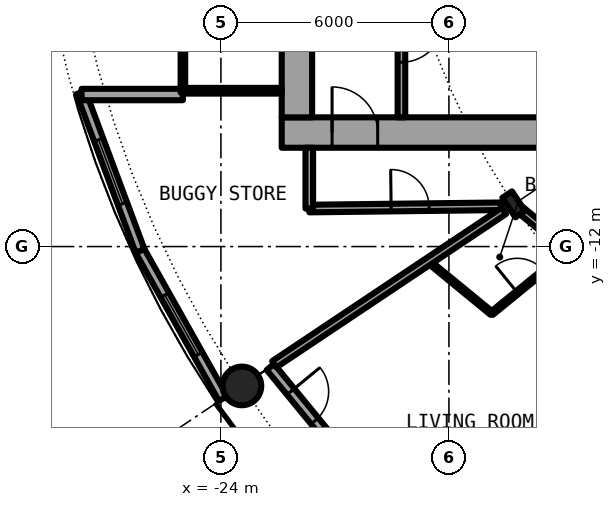
"""IFC4 building model, lengths in metres.
Left out: names, types, materials, properties, quantities, classifications, styles, units other than length and angle.
Written with IfcOpenShell. Run it as: python <this file> out.ifc"""

import sys

from ifc_helpers import new_model, si_unit, direction, frame, frame_2d, origin, origin_2d, place, context, subcontext, project, spatial, rectangle, hollow_circle, i_section, extrude, element, fill, save


model = new_model("IFC4")
c1 = context("Model", 3, precision=1e-05, world=origin(), true_north=direction((0.0, 1.0)))
c2 = subcontext(c1, "Body", "Model", "MODEL_VIEW")
j1 = project(units=[si_unit("LENGTHUNIT", "METRE"), si_unit("PLANEANGLEUNIT", "RADIAN")], contexts=[c1])
p1 = place(None, origin())
s1 = spatial("IfcSite", under=j1, at=p1, CompositionType="ELEMENT")
p2 = place(p1, origin())
s2 = spatial("IfcBuilding", under=s1, at=p2, CompositionType="ELEMENT")
p3 = place(p2, frame((0.0, 0.0, 35.0)))
s3 = spatial("IfcBuildingStorey", under=s2, at=p3, CompositionType="ELEMENT", Elevation=35.0)
p4 = place(p3, frame((-23.448, -15.667, 0.0), z_axis=(0.0, 0.0, 1.0), x_axis=(1.0, 0.0, 0.0)))
e1 = element("IfcColumn", 1, at=p4, inside=s3, PredefinedType="COLUMN", context=c2, shape_type="SweptSolid", body=[
    extrude(hollow_circle(Radius=0.508, WallThickness=0.05, at=origin_2d()), origin(), (0.0, 0.0, 1.0), 3.05),
])
p5 = place(p3, frame((-16.297, -10.889, 0.0), z_axis=(0.0, 0.0, 1.0), x_axis=(-0.831469612303, -0.55557023302, 0.0)))
e2 = element("IfcColumn", 2, at=p5, inside=s3, PredefinedType="COLUMN", context=c2, shape_type="SweptSolid", body=[
    extrude(i_section(OverallWidth=0.305, OverallDepth=0.62, WebThickness=0.021, FlangeThickness=0.04, FilletRadius=0.027, at=origin_2d()), origin(), (0.0, 0.0, 1.0), 3.05),
])
p6 = place(p3, frame((-22.699, -15.167, 0.0), z_axis=(0.0, 0.0, 1.0), x_axis=(0.634382322723, -0.773019449054, 0.0)))
e3 = element("IfcWall", 3, at=p6, inside=s3, PredefinedType="SOLIDWALL", context=c2, shape_type="SweptSolid", body=[
    extrude(rectangle(XDim=5.352, YDim=0.25, at=frame_2d((2.676, 0.0))), origin(), (0.0, 0.0, 1.0), 2.7),
])
p7 = place(p6, frame((0.841, 0.0, 0.0)))
e4 = element("IfcOpeningElement", 4, at=p7, cuts=e3, PredefinedType="OPENING", context=c2, shape_type="SweptSolid", body=[
    extrude(rectangle(XDim=1.0, YDim=2.2, at=frame_2d((0.5, 1.1))), frame((0.0, 0.135, 0.0), z_axis=(0.0, -1.0, 0.0), x_axis=(1.0, 0.0, 0.0)), (0.0, 0.0, 1.0), 0.27),
])
p8 = place(p6, frame((3.111, 0.0, 0.3)))
e5 = element("IfcOpeningElement", 5, at=p8, cuts=e3, PredefinedType="OPENING", context=c2, shape_type="SweptSolid", body=[
    extrude(rectangle(XDim=1.8, YDim=2.1, at=frame_2d((0.9, 1.05))), frame((0.0, 0.135, 0.0), z_axis=(0.0, -1.0, 0.0), x_axis=(1.0, 0.0, 0.0)), (0.0, 0.0, 1.0), 0.27),
])
p9 = place(p3, frame((-27.682, -7.945, 0.0), z_axis=(0.0, 0.0, 1.0), x_axis=(0.349247811493, -0.937030397675, 0.0)))
e6 = element("IfcWall", 6, at=p9, inside=s3, PredefinedType="SOLIDWALL", context=c2, shape_type="SweptSolid", body=[
    extrude(rectangle(XDim=4.452, YDim=0.25, at=frame_2d((2.226, 0.0))), origin(), (0.0, 0.0, 1.0), 2.7),
])
p10 = place(p9, frame((1.327, 0.0, 0.3)))
e7 = element("IfcOpeningElement", 7, at=p10, cuts=e6, PredefinedType="OPENING", context=c2, shape_type="SweptSolid", body=[
    extrude(rectangle(XDim=1.8, YDim=2.1, at=frame_2d((0.9, 1.05))), frame((0.0, 0.135, 0.0), z_axis=(0.0, -1.0, 0.0), x_axis=(1.0, 0.0, 0.0)), (0.0, 0.0, 1.0), 0.27),
])
p11 = place(p3, frame((-26.127, -12.117, 0.0), z_axis=(0.0, 0.0, 1.0), x_axis=(0.489696356642, -0.871893042919, 0.0)))
e8 = element("IfcWall", 8, at=p11, inside=s3, PredefinedType="SOLIDWALL", context=c2, shape_type="SweptSolid", body=[
    extrude(rectangle(XDim=4.454, YDim=0.25, at=frame_2d((2.227, 0.0))), origin(), (0.0, 0.0, 1.0), 2.7),
])
p12 = place(p11, frame((1.327, 0.0, 0.3)))
e9 = element("IfcOpeningElement", 9, at=p12, cuts=e8, PredefinedType="OPENING", context=c2, shape_type="SweptSolid", body=[
    extrude(rectangle(XDim=1.8, YDim=2.1, at=frame_2d((0.9, 1.05))), frame((0.0, 0.135, 0.0), z_axis=(0.0, -1.0, 0.0), x_axis=(1.0, 0.0, 0.0)), (0.0, 0.0, 1.0), 0.27),
])
p13 = place(p3, frame((-25.0, -8.0, 0.0), z_axis=(0.0, 0.0, 1.0), x_axis=(-1.0, 0.0, 0.0)))
e10 = element("IfcWall", 10, at=p13, inside=s3, PredefinedType="SOLIDWALL", context=c2, shape_type="SweptSolid", body=[
    extrude(rectangle(XDim=2.667, YDim=0.3, at=frame_2d((1.333, 0.0))), origin(), (0.0, 0.0, 1.0), 2.7),
])
p14 = place(p3, frame((-22.4, -9.0, 0.0), z_axis=(0.0, 0.0, 1.0), x_axis=(1.0, 0.0, 0.0)))
e11 = element("IfcWall", 11, at=p14, inside=s3, PredefinedType="SHEAR", context=c2, shape_type="SweptSolid", body=[
    extrude(rectangle(XDim=14.2, YDim=0.8, at=frame_2d((7.1, 0.0))), origin(), (0.0, 0.0, 1.0), 3.05),
])
p15 = place(p14, frame((1.325, 0.0, 0.0)))
e12 = element("IfcOpeningElement", 12, at=p15, cuts=e11, PredefinedType="OPENING", context=c2, shape_type="SweptSolid", body=[
    extrude(rectangle(XDim=1.2, YDim=2.3, at=frame_2d((0.6, 1.15))), frame((0.0, 0.41, 0.0), z_axis=(0.0, -1.0, 0.0), x_axis=(1.0, 0.0, 0.0)), (0.0, 0.0, 1.0), 0.82),
])
p16 = place(p3, frame((-22.0, -8.6, 0.0), z_axis=(0.0, 0.0, 1.0), x_axis=(0.0, 1.0, 0.0)))
e13 = element("IfcWall", 13, at=p16, inside=s3, PredefinedType="SHEAR", context=c2, shape_type="SweptSolid", body=[
    extrude(rectangle(XDim=17.2, YDim=0.8, at=frame_2d((8.6, 0.0))), origin(), (0.0, 0.0, 1.0), 3.05),
])
p17 = place(p16, frame((7.7, 0.0, 0.0)))
e14 = element("IfcOpeningElement", 14, at=p17, cuts=e13, PredefinedType="OPENING", context=c2, shape_type="SweptSolid", body=[
    extrude(rectangle(XDim=1.8, YDim=2.3, at=frame_2d((0.9, 1.15))), frame((0.0, 0.41, 0.0), z_axis=(0.0, -1.0, 0.0), x_axis=(1.0, 0.0, 0.0)), (0.0, 0.0, 1.0), 0.82),
])
p18 = place(p3, frame((-19.25, -1.575, 0.0), z_axis=(0.0, 0.0, 1.0), x_axis=(0.0, -1.0, 0.0)))
e15 = element("IfcWall", 15, at=p18, inside=s3, PredefinedType="SOLIDWALL", context=c2, shape_type="SweptSolid", body=[
    extrude(rectangle(XDim=7.025, YDim=0.2, at=frame_2d((3.513, 0.0))), origin(), (0.0, 0.0, 1.0), 2.7),
])
p19 = place(p18, frame((4.475, 0.0, 0.0)))
e16 = element("IfcOpeningElement", 16, at=p19, cuts=e15, PredefinedType="OPENING", context=c2, shape_type="SweptSolid", body=[
    extrude(rectangle(XDim=1.1, YDim=2.3, at=frame_2d((0.55, 1.15))), frame((0.0, 0.11, 0.0), z_axis=(0.0, -1.0, 0.0), x_axis=(1.0, 0.0, 0.0)), (0.0, 0.0, 1.0), 0.22),
])
p20 = place(p3, frame((-22.4, -7.9, 0.0), z_axis=(0.0, 0.0, 1.0), x_axis=(-1.0, 0.0, 0.0)))
e17 = element("IfcWall", 17, at=p20, inside=s3, PredefinedType="PARTITIONING", context=c2, shape_type="SweptSolid", body=[
    extrude(rectangle(XDim=2.54, YDim=0.15, at=frame_2d((1.27, 0.0))), origin(), (0.0, 0.0, 1.0), 2.7),
])
p21 = place(p3, frame((-25.0, 7.95, 0.0), z_axis=(0.0, 0.0, 1.0), x_axis=(0.0, -1.0, 0.0)))
e18 = element("IfcWall", 18, at=p21, inside=s3, PredefinedType="PARTITIONING", context=c2, shape_type="SweptSolid", body=[
    extrude(rectangle(XDim=15.9, YDim=0.12, at=frame_2d((7.95, 0.0))), origin(), (0.0, 0.0, 1.0), 2.7),
])
p22 = place(p21, frame((0.95, 0.0, 0.1)))
e19 = element("IfcOpeningElement", 19, at=p22, cuts=e18, PredefinedType="OPENING", context=c2, shape_type="SweptSolid", body=[
    extrude(rectangle(XDim=14.0, YDim=2.35, at=frame_2d((7.0, 1.175))), frame((0.0, 0.07, 0.0), z_axis=(0.0, -1.0, 0.0), x_axis=(1.0, 0.0, 0.0)), (0.0, 0.0, 1.0), 0.14),
])
p23 = place(p3, frame((-18.542, -12.389, 0.0), z_axis=(0.0, 0.0, 1.0), x_axis=(0.772948171844, -0.634469166818, 0.0)))
e20 = element("IfcWall", 20, at=p23, inside=s3, PredefinedType="PARTITIONING", context=c2, shape_type="SweptSolid", body=[
    extrude(rectangle(XDim=2.158, YDim=0.1, at=frame_2d((1.079, 0.0))), origin(), (0.0, 0.0, 1.0), 2.7),
])
p24 = place(p3, frame((-16.173, -10.99, 0.0), z_axis=(0.0, 0.0, 1.0), x_axis=(0.772704887747, -0.634765434198, 0.0)))
e21 = element("IfcWall", 21, at=p24, inside=s3, PredefinedType="PARTITIONING", context=c2, shape_type="SweptSolid", body=[
    extrude(rectangle(XDim=11.209, YDim=0.2, at=frame_2d((5.604, 0.0))), origin(), (0.0, 0.0, 1.0), 2.38),
])
p25 = place(p24, frame((3.137, 0.0, 0.0)))
e22 = element("IfcOpeningElement", 22, at=p25, cuts=e21, PredefinedType="OPENING", context=c2, shape_type="SweptSolid", body=[
    extrude(rectangle(XDim=1.0, YDim=2.3, at=frame_2d((0.5, 1.15))), frame((0.0, 0.11, 0.0), z_axis=(0.0, -1.0, 0.0), x_axis=(1.0, 0.0, 0.0)), (0.0, 0.0, 1.0), 0.22),
])
p26 = place(p3, frame((-21.675, -11.0, 0.0), z_axis=(0.0, 0.0, 1.0), x_axis=(0.999928980998, 0.011917758204, 0.0)))
e23 = element("IfcWall", 23, at=p26, inside=s3, PredefinedType="PARTITIONING", context=c2, shape_type="SweptSolid", body=[
    extrude(rectangle(XDim=5.039, YDim=0.2, at=frame_2d((2.52, 0.0))), origin(), (0.0, 0.0, 1.0), 2.7),
])
p27 = place(p26, frame((2.154, 0.0, 0.0)))
e24 = element("IfcOpeningElement", 24, at=p27, cuts=e23, PredefinedType="OPENING", context=c2, shape_type="SweptSolid", body=[
    extrude(rectangle(XDim=1.0, YDim=2.3, at=frame_2d((0.5, 1.15))), frame((0.0, 0.11, 0.0), z_axis=(0.0, -1.0, 0.0), x_axis=(1.0, 0.0, 0.0)), (0.0, 0.0, 1.0), 0.22),
])
p28 = place(p3, frame((-22.596, -15.097, 0.0), z_axis=(0.0, 0.0, 1.0), x_axis=(0.831610607528, 0.555359160765, 0.0)))
e25 = element("IfcWall", 25, at=p28, inside=s3, PredefinedType="PARTITIONING", context=c2, shape_type="SweptSolid", body=[
    extrude(rectangle(XDim=7.265, YDim=0.2, at=frame_2d((3.633, 0.0))), origin(), (0.0, 0.0, 1.0), 2.7),
])
p29 = place(p3, frame((-17.24, -21.007, 0.0), z_axis=(0.0, 0.0, 1.0), x_axis=(0.634396151441, 0.77300810024, 0.0)))
e26 = element("IfcWall", 26, at=p29, inside=s3, PredefinedType="PARTITIONING", context=c2, shape_type="SweptSolid", body=[
    extrude(rectangle(XDim=8.419, YDim=0.1, at=frame_2d((4.209, 0.0))), origin(), (0.0, 0.0, 1.0), 2.7),
])
p30 = place(p29, frame((6.679, 0.0, 0.0)))
e27 = element("IfcOpeningElement", 27, at=p30, cuts=e26, PredefinedType="OPENING", context=c2, shape_type="SweptSolid", body=[
    extrude(rectangle(XDim=0.9, YDim=2.3, at=frame_2d((0.45, 1.15))), frame((0.0, 0.06, 0.0), z_axis=(0.0, -1.0, 0.0), x_axis=(1.0, 0.0, 0.0)), (0.0, 0.0, 1.0), 0.12),
])
p31 = place(p29, frame((2.468, 0.0, 0.0)))
e28 = element("IfcOpeningElement", 28, at=p31, cuts=e26, PredefinedType="OPENING", context=c2, shape_type="SweptSolid", body=[
    extrude(rectangle(XDim=0.9, YDim=2.3, at=frame_2d((0.45, 1.15))), frame((0.0, 0.06, 0.0), z_axis=(0.0, -1.0, 0.0), x_axis=(1.0, 0.0, 0.0)), (0.0, 0.0, 1.0), 0.12),
])
p32 = place(p3, frame((-16.874, -13.758, 0.0), z_axis=(0.0, 0.0, 1.0), x_axis=(0.774979608522, 0.631986239072, 0.0)))
e29 = element("IfcWall", 29, at=p32, inside=s3, PredefinedType="PARTITIONING", context=c2, shape_type="SweptSolid", body=[
    extrude(rectangle(XDim=2.636, YDim=0.1, at=frame_2d((1.318, 0.0))), origin(), (0.0, 0.0, 1.0), 2.7),
])
p33 = place(p32, frame((0.868, 0.0, 0.0)))
e30 = element("IfcOpeningElement", 30, at=p33, cuts=e29, PredefinedType="OPENING", context=c2, shape_type="SweptSolid", body=[
    extrude(rectangle(XDim=0.9, YDim=2.3, at=frame_2d((0.45, 1.15))), frame((0.0, 0.06, 0.0), z_axis=(0.0, -1.0, 0.0), x_axis=(1.0, 0.0, 0.0)), (0.0, 0.0, 1.0), 0.12),
])
p34 = place(p3, frame((-21.675, -11.0, 0.0), z_axis=(0.0, 0.0, 1.0), x_axis=(0.0, 1.0, 0.0)))
e31 = element("IfcWall", 31, at=p34, inside=s3, PredefinedType="PARTITIONING", context=c2, shape_type="SweptSolid", body=[
    extrude(rectangle(XDim=1.6, YDim=0.2, at=frame_2d((0.8, 0.0))), origin(), (0.0, 0.0, 1.0), 2.7),
])
p35 = place(p7, origin())
e32 = element("IfcDoor", 32, at=p35, inside=s3, OperationType="SINGLE_SWING_LEFT", PredefinedType="DOOR", context=c2, shape_type="SweptSolid", body=[
    extrude(rectangle(XDim=1.0, YDim=2.2, at=frame_2d((0.5, 1.1))), frame((0.0, 0.025, 0.0), z_axis=(0.0, -1.0, 0.0), x_axis=(1.0, 0.0, 0.0)), (0.0, 0.0, 1.0), 0.05),
])
fill(e4, e32)
p36 = place(p10, origin())
e33 = element("IfcWindow", 33, at=p36, inside=s3, PartitioningType="SINGLE_PANEL", PredefinedType="WINDOW", context=c2, shape_type="SweptSolid", body=[
    extrude(rectangle(XDim=1.8, YDim=2.1, at=frame_2d((0.9, 1.05))), frame((0.0, 0.03, 0.0), z_axis=(0.0, -1.0, 0.0), x_axis=(1.0, 0.0, 0.0)), (0.0, 0.0, 1.0), 0.06),
])
fill(e7, e33)
p37 = place(p12, origin())
e34 = element("IfcWindow", 34, at=p37, inside=s3, PartitioningType="SINGLE_PANEL", PredefinedType="WINDOW", context=c2, shape_type="SweptSolid", body=[
    extrude(rectangle(XDim=1.8, YDim=2.1, at=frame_2d((0.9, 1.05))), frame((0.0, 0.03, 0.0), z_axis=(0.0, -1.0, 0.0), x_axis=(1.0, 0.0, 0.0)), (0.0, 0.0, 1.0), 0.06),
])
fill(e9, e34)
p38 = place(p19, origin())
e35 = element("IfcDoor", 35, at=p38, inside=s3, OperationType="SINGLE_SWING_LEFT", PredefinedType="DOOR", context=c2, shape_type="SweptSolid", body=[
    extrude(rectangle(XDim=1.1, YDim=2.3, at=frame_2d((0.55, 1.15))), frame((0.0, 0.025, 0.0), z_axis=(0.0, -1.0, 0.0), x_axis=(1.0, 0.0, 0.0)), (0.0, 0.0, 1.0), 0.05),
])
fill(e16, e35)
p39 = place(p15, origin())
e36 = element("IfcDoor", 36, at=p39, inside=s3, OperationType="SINGLE_SWING_RIGHT", PredefinedType="DOOR", context=c2, shape_type="SweptSolid", body=[
    extrude(rectangle(XDim=1.2, YDim=2.3, at=frame_2d((0.6, 1.15))), frame((0.0, 0.025, 0.0), z_axis=(0.0, -1.0, 0.0), x_axis=(1.0, 0.0, 0.0)), (0.0, 0.0, 1.0), 0.05),
])
fill(e12, e36)
p40 = place(p22, origin())
e37 = element("IfcWindow", 37, at=p40, inside=s3, PartitioningType="SINGLE_PANEL", PredefinedType="WINDOW", context=c2, shape_type="SweptSolid", body=[
    extrude(rectangle(XDim=14.0, YDim=2.35, at=frame_2d((7.0, 1.175))), frame((0.0, 0.03, 0.0), z_axis=(0.0, -1.0, 0.0), x_axis=(1.0, 0.0, 0.0)), (0.0, 0.0, 1.0), 0.06),
])
fill(e19, e37)
p41 = place(p33, origin())
e38 = element("IfcDoor", 38, at=p41, inside=s3, OperationType="SINGLE_SWING_LEFT", PredefinedType="DOOR", context=c2, shape_type="SweptSolid", body=[
    extrude(rectangle(XDim=0.9, YDim=2.3, at=frame_2d((0.45, 1.15))), frame((0.0, 0.025, 0.0), z_axis=(0.0, -1.0, 0.0), x_axis=(1.0, 0.0, 0.0)), (0.0, 0.0, 1.0), 0.05),
])
fill(e30, e38)
p42 = place(p27, origin())
e39 = element("IfcDoor", 39, at=p42, inside=s3, OperationType="SINGLE_SWING_RIGHT", PredefinedType="DOOR", context=c2, shape_type="SweptSolid", body=[
    extrude(rectangle(XDim=1.0, YDim=2.3, at=frame_2d((0.5, 1.15))), frame((0.0, 0.025, 0.0), z_axis=(0.0, -1.0, 0.0), x_axis=(1.0, 0.0, 0.0)), (0.0, 0.0, 1.0), 0.05),
])
fill(e24, e39)
save(model, sys.argv[1])
